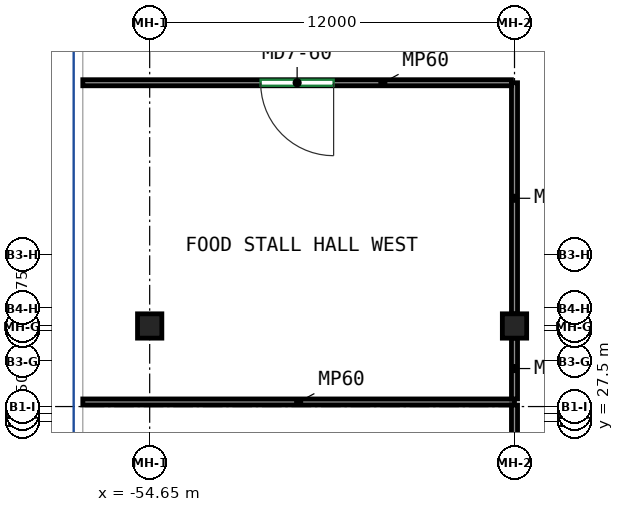
"""IFC4 building model, lengths in metres.
Left out: names, types, materials, properties, quantities, classifications, styles, units other than length and angle.
Written with IfcOpenShell. Run it as: python <this file> out.ifc"""

import sys

from ifc_helpers import new_model, si_unit, direction, frame, frame_2d, origin, origin_2d, place, context, subcontext, project, spatial, rectangle, extrude, source, transform, mapped, element, fill, save


model = new_model("IFC4")
c1 = context("Model", 3, precision=1e-05, world=origin(), true_north=direction((0.0, 1.0)))
c2 = subcontext(c1, "Body", "Model", "MODEL_VIEW")
j1 = project(units=[si_unit("LENGTHUNIT", "METRE"), si_unit("PLANEANGLEUNIT", "RADIAN")], contexts=[c1])
p1 = place(None, origin())
s1 = spatial("IfcSite", under=j1, at=p1, CompositionType="ELEMENT")
p2 = place(p1, origin())
s2 = spatial("IfcBuilding", under=s1, at=p2, CompositionType="ELEMENT")
p3 = place(p2, frame((0.0, 0.0, 9.0)))
s3 = spatial("IfcBuildingStorey", under=s2, at=p3, CompositionType="ELEMENT", Elevation=9.0)
m1 = source(origin(), c2, "Body", "SweptSolid", [
    extrude(rectangle(XDim=0.8, YDim=0.8, at=origin_2d()), origin(), (0.0, 0.0, 1.0), 4.1),
])
for number, where, z_axis, x_axis in (
    (1, (-54.65, 30.65, 0.0), (0.0, 0.0, 1.0), (1.0, 0.0, 0.0)),
    (2, (-42.65, 30.65, 0.0), (0.0, 0.0, 1.0), (1.0, 0.0, 0.0)),
):
    element("IfcColumn", number, at=place(p3, frame(where, z_axis=z_axis, x_axis=x_axis)), inside=s3, PredefinedType="COLUMN", context=c2, shape_type="MappedRepresentation", body=[
        mapped(m1, transform((0.0, 0.0, 0.0))),
    ])
m2 = source(origin(), c2, "Body", "SweptSolid", [
    extrude(rectangle(XDim=100.7, YDim=0.3, at=frame_2d((50.35, 0.0))), origin(), (0.0, 0.0, 1.0), 4.1),
])
p4 = place(p3, frame((-57.0, -43.55, 0.0), z_axis=(0.0, 0.0, 1.0), x_axis=(0.0, 1.0, 0.0)))
e3 = element("IfcWall", 3, at=p4, inside=s3, PredefinedType="SOLIDWALL", context=c2, shape_type="MappedRepresentation", body=[
    mapped(m2, transform((0.0, 0.0, 0.0))),
])
p5 = place(p4, frame((3.15, 0.0, 0.9)))
e4 = element("IfcOpeningElement", 4, at=p5, cuts=e3, PredefinedType="OPENING", context=c2, shape_type="SweptSolid", body=[
    extrude(rectangle(XDim=2.4, YDim=1.8, at=frame_2d((1.2, 0.9))), frame((0.0, 0.16, 0.0), z_axis=(0.0, -1.0, 0.0), x_axis=(1.0, 0.0, 0.0)), (0.0, 0.0, 1.0), 0.32),
])
p6 = place(p4, frame((7.15, 0.0, 0.9)))
e5 = element("IfcOpeningElement", 5, at=p6, cuts=e3, PredefinedType="OPENING", context=c2, shape_type="SweptSolid", body=[
    extrude(rectangle(XDim=2.4, YDim=1.8, at=frame_2d((1.2, 0.9))), frame((0.0, 0.16, 0.0), z_axis=(0.0, -1.0, 0.0), x_axis=(1.0, 0.0, 0.0)), (0.0, 0.0, 1.0), 0.32),
])
p7 = place(p4, frame((11.15, 0.0, 0.9)))
e6 = element("IfcOpeningElement", 6, at=p7, cuts=e3, PredefinedType="OPENING", context=c2, shape_type="SweptSolid", body=[
    extrude(rectangle(XDim=2.4, YDim=1.8, at=frame_2d((1.2, 0.9))), frame((0.0, 0.16, 0.0), z_axis=(0.0, -1.0, 0.0), x_axis=(1.0, 0.0, 0.0)), (0.0, 0.0, 1.0), 0.32),
])
p8 = place(p4, frame((19.15, 0.0, 0.9)))
e7 = element("IfcOpeningElement", 7, at=p8, cuts=e3, PredefinedType="OPENING", context=c2, shape_type="SweptSolid", body=[
    extrude(rectangle(XDim=2.4, YDim=1.8, at=frame_2d((1.2, 0.9))), frame((0.0, 0.16, 0.0), z_axis=(0.0, -1.0, 0.0), x_axis=(1.0, 0.0, 0.0)), (0.0, 0.0, 1.0), 0.32),
])
p9 = place(p4, frame((23.15, 0.0, 0.9)))
e8 = element("IfcOpeningElement", 8, at=p9, cuts=e3, PredefinedType="OPENING", context=c2, shape_type="SweptSolid", body=[
    extrude(rectangle(XDim=2.4, YDim=1.8, at=frame_2d((1.2, 0.9))), frame((0.0, 0.16, 0.0), z_axis=(0.0, -1.0, 0.0), x_axis=(1.0, 0.0, 0.0)), (0.0, 0.0, 1.0), 0.32),
])
p10 = place(p4, frame((27.15, 0.0, 0.9)))
e9 = element("IfcOpeningElement", 9, at=p10, cuts=e3, PredefinedType="OPENING", context=c2, shape_type="SweptSolid", body=[
    extrude(rectangle(XDim=2.4, YDim=1.8, at=frame_2d((1.2, 0.9))), frame((0.0, 0.16, 0.0), z_axis=(0.0, -1.0, 0.0), x_axis=(1.0, 0.0, 0.0)), (0.0, 0.0, 1.0), 0.32),
])
p11 = place(p4, frame((31.15, 0.0, 0.9)))
e10 = element("IfcOpeningElement", 10, at=p11, cuts=e3, PredefinedType="OPENING", context=c2, shape_type="SweptSolid", body=[
    extrude(rectangle(XDim=2.4, YDim=1.8, at=frame_2d((1.2, 0.9))), frame((0.0, 0.16, 0.0), z_axis=(0.0, -1.0, 0.0), x_axis=(1.0, 0.0, 0.0)), (0.0, 0.0, 1.0), 0.32),
])
p12 = place(p4, frame((39.15, 0.0, 0.9)))
e11 = element("IfcOpeningElement", 11, at=p12, cuts=e3, PredefinedType="OPENING", context=c2, shape_type="SweptSolid", body=[
    extrude(rectangle(XDim=2.4, YDim=1.8, at=frame_2d((1.2, 0.9))), frame((0.0, 0.16, 0.0), z_axis=(0.0, -1.0, 0.0), x_axis=(1.0, 0.0, 0.0)), (0.0, 0.0, 1.0), 0.32),
])
p13 = place(p4, frame((43.15, 0.0, 0.9)))
e12 = element("IfcOpeningElement", 12, at=p13, cuts=e3, PredefinedType="OPENING", context=c2, shape_type="SweptSolid", body=[
    extrude(rectangle(XDim=2.4, YDim=1.8, at=frame_2d((1.2, 0.9))), frame((0.0, 0.16, 0.0), z_axis=(0.0, -1.0, 0.0), x_axis=(1.0, 0.0, 0.0)), (0.0, 0.0, 1.0), 0.32),
])
p14 = place(p4, frame((51.15, 0.0, 0.9)))
e13 = element("IfcOpeningElement", 13, at=p14, cuts=e3, PredefinedType="OPENING", context=c2, shape_type="SweptSolid", body=[
    extrude(rectangle(XDim=2.4, YDim=1.8, at=frame_2d((1.2, 0.9))), frame((0.0, 0.16, 0.0), z_axis=(0.0, -1.0, 0.0), x_axis=(1.0, 0.0, 0.0)), (0.0, 0.0, 1.0), 0.32),
])
p15 = place(p4, frame((55.15, 0.0, 0.9)))
e14 = element("IfcOpeningElement", 14, at=p15, cuts=e3, PredefinedType="OPENING", context=c2, shape_type="SweptSolid", body=[
    extrude(rectangle(XDim=2.4, YDim=1.8, at=frame_2d((1.2, 0.9))), frame((0.0, 0.16, 0.0), z_axis=(0.0, -1.0, 0.0), x_axis=(1.0, 0.0, 0.0)), (0.0, 0.0, 1.0), 0.32),
])
p16 = place(p4, frame((59.15, 0.0, 0.9)))
e15 = element("IfcOpeningElement", 15, at=p16, cuts=e3, PredefinedType="OPENING", context=c2, shape_type="SweptSolid", body=[
    extrude(rectangle(XDim=2.4, YDim=1.8, at=frame_2d((1.2, 0.9))), frame((0.0, 0.16, 0.0), z_axis=(0.0, -1.0, 0.0), x_axis=(1.0, 0.0, 0.0)), (0.0, 0.0, 1.0), 0.32),
])
p17 = place(p4, frame((63.15, 0.0, 0.9)))
e16 = element("IfcOpeningElement", 16, at=p17, cuts=e3, PredefinedType="OPENING", context=c2, shape_type="SweptSolid", body=[
    extrude(rectangle(XDim=2.4, YDim=1.8, at=frame_2d((1.2, 0.9))), frame((0.0, 0.16, 0.0), z_axis=(0.0, -1.0, 0.0), x_axis=(1.0, 0.0, 0.0)), (0.0, 0.0, 1.0), 0.32),
])
p18 = place(p4, frame((67.15, 0.0, 0.9)))
e17 = element("IfcOpeningElement", 17, at=p18, cuts=e3, PredefinedType="OPENING", context=c2, shape_type="SweptSolid", body=[
    extrude(rectangle(XDim=2.4, YDim=1.8, at=frame_2d((1.2, 0.9))), frame((0.0, 0.16, 0.0), z_axis=(0.0, -1.0, 0.0), x_axis=(1.0, 0.0, 0.0)), (0.0, 0.0, 1.0), 0.32),
])
p19 = place(p4, frame((75.15, 0.0, 0.9)))
e18 = element("IfcOpeningElement", 18, at=p19, cuts=e3, PredefinedType="OPENING", context=c2, shape_type="SweptSolid", body=[
    extrude(rectangle(XDim=2.4, YDim=1.8, at=frame_2d((1.2, 0.9))), frame((0.0, 0.16, 0.0), z_axis=(0.0, -1.0, 0.0), x_axis=(1.0, 0.0, 0.0)), (0.0, 0.0, 1.0), 0.32),
])
p20 = place(p4, frame((79.15, 0.0, 0.9)))
e19 = element("IfcOpeningElement", 19, at=p20, cuts=e3, PredefinedType="OPENING", context=c2, shape_type="SweptSolid", body=[
    extrude(rectangle(XDim=2.4, YDim=1.8, at=frame_2d((1.2, 0.9))), frame((0.0, 0.16, 0.0), z_axis=(0.0, -1.0, 0.0), x_axis=(1.0, 0.0, 0.0)), (0.0, 0.0, 1.0), 0.32),
])
p21 = place(p4, frame((83.15, 0.0, 0.9)))
e20 = element("IfcOpeningElement", 20, at=p21, cuts=e3, PredefinedType="OPENING", context=c2, shape_type="SweptSolid", body=[
    extrude(rectangle(XDim=2.4, YDim=1.8, at=frame_2d((1.2, 0.9))), frame((0.0, 0.16, 0.0), z_axis=(0.0, -1.0, 0.0), x_axis=(1.0, 0.0, 0.0)), (0.0, 0.0, 1.0), 0.32),
])
p22 = place(p4, frame((87.15, 0.0, 0.9)))
e21 = element("IfcOpeningElement", 21, at=p22, cuts=e3, PredefinedType="OPENING", context=c2, shape_type="SweptSolid", body=[
    extrude(rectangle(XDim=2.4, YDim=1.8, at=frame_2d((1.2, 0.9))), frame((0.0, 0.16, 0.0), z_axis=(0.0, -1.0, 0.0), x_axis=(1.0, 0.0, 0.0)), (0.0, 0.0, 1.0), 0.32),
])
p23 = place(p4, frame((91.15, 0.0, 0.9)))
e22 = element("IfcOpeningElement", 22, at=p23, cuts=e3, PredefinedType="OPENING", context=c2, shape_type="SweptSolid", body=[
    extrude(rectangle(XDim=2.4, YDim=1.8, at=frame_2d((1.2, 0.9))), frame((0.0, 0.16, 0.0), z_axis=(0.0, -1.0, 0.0), x_axis=(1.0, 0.0, 0.0)), (0.0, 0.0, 1.0), 0.32),
])
p24 = place(p4, frame((95.15, 0.0, 0.9)))
e23 = element("IfcOpeningElement", 23, at=p24, cuts=e3, PredefinedType="OPENING", context=c2, shape_type="SweptSolid", body=[
    extrude(rectangle(XDim=2.4, YDim=1.8, at=frame_2d((1.2, 0.9))), frame((0.0, 0.16, 0.0), z_axis=(0.0, -1.0, 0.0), x_axis=(1.0, 0.0, 0.0)), (0.0, 0.0, 1.0), 0.32),
])
m3 = source(origin(), c2, "Body", "SweptSolid", [
    extrude(rectangle(XDim=14.2, YDim=0.2, at=frame_2d((7.1, 0.0))), origin(), (0.0, 0.0, 1.0), 3.2),
])
p25 = place(p3, frame((-56.85, 28.15, 0.0), z_axis=(0.0, 0.0, 1.0), x_axis=(1.0, 0.0, 0.0)))
e24 = element("IfcWall", 24, at=p25, inside=s3, PredefinedType="PARTITIONING", context=c2, shape_type="MappedRepresentation", body=[
    mapped(m3, transform((0.0, 0.0, 0.0))),
])
m4 = source(origin(), c2, "Body", "SweptSolid", [
    extrude(rectangle(XDim=10.3, YDim=0.2, at=frame_2d((5.15, 0.0))), origin(), (0.0, 0.0, 1.0), 3.2),
])
p26 = place(p3, frame((-42.65, 17.75, 0.0), z_axis=(0.0, 0.0, 1.0), x_axis=(0.0, 1.0, 0.0)))
e25 = element("IfcWall", 25, at=p26, inside=s3, PredefinedType="PARTITIONING", context=c2, shape_type="MappedRepresentation", body=[
    mapped(m4, transform((0.0, 0.0, 0.0))),
])
p27 = place(p26, frame((3.95, 0.0, 0.0)))
e26 = element("IfcOpeningElement", 26, at=p27, cuts=e25, PredefinedType="OPENING", context=c2, shape_type="SweptSolid", body=[
    extrude(rectangle(XDim=2.4, YDim=2.4, at=frame_2d((1.2, 1.2))), frame((0.0, 0.11, 0.0), z_axis=(0.0, -1.0, 0.0), x_axis=(1.0, 0.0, 0.0)), (0.0, 0.0, 1.0), 0.22),
])
m5 = source(origin(), c2, "Body", "SweptSolid", [
    extrude(rectangle(XDim=2.0, YDim=0.2, at=frame_2d((1.0, 0.0))), origin(), (0.0, 0.0, 1.0), 3.2),
])
p28 = place(p3, frame((-42.65, 28.25, 0.0), z_axis=(0.0, 0.0, 1.0), x_axis=(0.0, 1.0, 0.0)))
e27 = element("IfcWall", 27, at=p28, inside=s3, PredefinedType="PARTITIONING", context=c2, shape_type="MappedRepresentation", body=[
    mapped(m5, transform((0.0, 0.0, 0.0))),
])
m6 = source(origin(), c2, "Body", "SweptSolid", [
    extrude(rectangle(XDim=7.6, YDim=0.2, at=frame_2d((3.8, 0.0))), origin(), (0.0, 0.0, 1.0), 3.2),
])
p29 = place(p3, frame((-42.65, 31.05, 0.0), z_axis=(0.0, 0.0, 1.0), x_axis=(0.0, 1.0, 0.0)))
e28 = element("IfcWall", 28, at=p29, inside=s3, PredefinedType="PARTITIONING", context=c2, shape_type="MappedRepresentation", body=[
    mapped(m6, transform((0.0, 0.0, 0.0))),
])
m7 = source(origin(), c2, "Body", "SweptSolid", [
    extrude(rectangle(XDim=14.1, YDim=0.2, at=frame_2d((7.05, 0.0))), origin(), (0.0, 0.0, 1.0), 3.2),
])
p30 = place(p3, frame((-42.75, 38.65, 0.0), z_axis=(0.0, 0.0, 1.0), x_axis=(-1.0, 0.0, 0.0)))
e29 = element("IfcWall", 29, at=p30, inside=s3, PredefinedType="PARTITIONING", context=c2, shape_type="MappedRepresentation", body=[
    mapped(m7, transform((0.0, 0.0, 0.0))),
])
p31 = place(p30, frame((5.85, 0.0, 0.0)))
e30 = element("IfcOpeningElement", 30, at=p31, cuts=e29, PredefinedType="OPENING", context=c2, shape_type="SweptSolid", body=[
    extrude(rectangle(XDim=2.4, YDim=2.4, at=frame_2d((1.2, 1.2))), frame((0.0, 0.11, 0.0), z_axis=(0.0, -1.0, 0.0), x_axis=(1.0, 0.0, 0.0)), (0.0, 0.0, 1.0), 0.22),
])
p32 = place(p19, origin())
e31 = element("IfcWindow", 31, at=p32, inside=s3, PartitioningType="SINGLE_PANEL", PredefinedType="WINDOW", context=c2, shape_type="SweptSolid", body=[
    extrude(rectangle(XDim=2.4, YDim=1.8, at=frame_2d((1.2, 0.9))), frame((0.0, 0.03, 0.0), z_axis=(0.0, -1.0, 0.0), x_axis=(1.0, 0.0, 0.0)), (0.0, 0.0, 1.0), 0.06),
])
fill(e18, e31)
p33 = place(p20, origin())
e32 = element("IfcWindow", 32, at=p33, inside=s3, PartitioningType="SINGLE_PANEL", PredefinedType="WINDOW", context=c2, shape_type="SweptSolid", body=[
    extrude(rectangle(XDim=2.4, YDim=1.8, at=frame_2d((1.2, 0.9))), frame((0.0, 0.03, 0.0), z_axis=(0.0, -1.0, 0.0), x_axis=(1.0, 0.0, 0.0)), (0.0, 0.0, 1.0), 0.06),
])
fill(e19, e32)
p34 = place(p21, origin())
e33 = element("IfcWindow", 33, at=p34, inside=s3, PartitioningType="SINGLE_PANEL", PredefinedType="WINDOW", context=c2, shape_type="SweptSolid", body=[
    extrude(rectangle(XDim=2.4, YDim=1.8, at=frame_2d((1.2, 0.9))), frame((0.0, 0.03, 0.0), z_axis=(0.0, -1.0, 0.0), x_axis=(1.0, 0.0, 0.0)), (0.0, 0.0, 1.0), 0.06),
])
fill(e20, e33)
p35 = place(p31, origin())
e34 = element("IfcDoor", 34, at=p35, inside=s3, OperationType="DOUBLE_DOOR_SINGLE_SWING", PredefinedType="DOOR", context=c2, shape_type="SweptSolid", body=[
    extrude(rectangle(XDim=2.4, YDim=2.4, at=frame_2d((1.2, 1.2))), frame((0.0, 0.025, 0.0), z_axis=(0.0, -1.0, 0.0), x_axis=(1.0, 0.0, 0.0)), (0.0, 0.0, 1.0), 0.05),
])
fill(e30, e34)
save(model, sys.argv[1])
